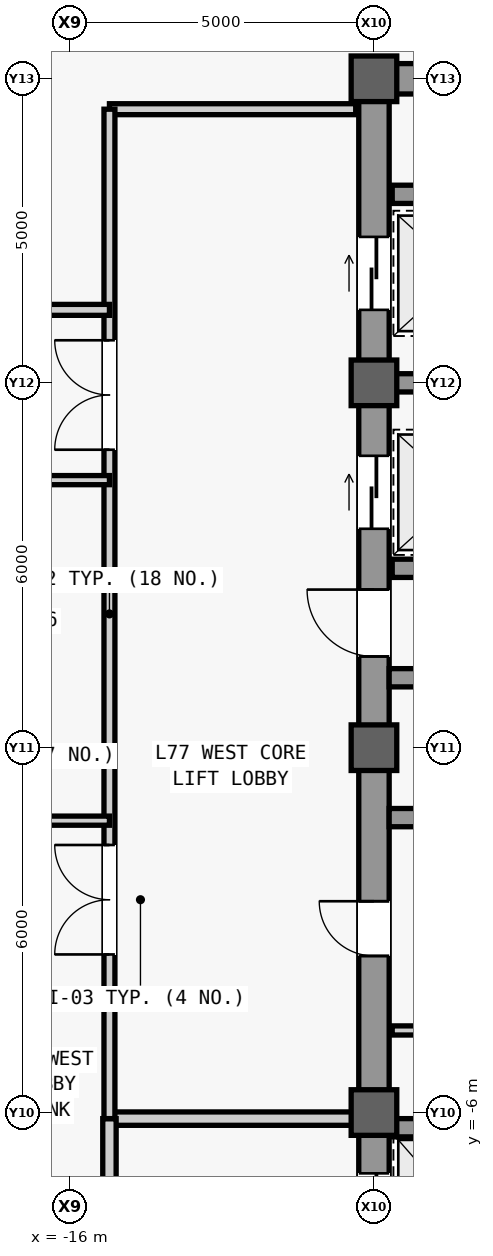
"""IFC4 building model, lengths in metres.
Left out: names, types, materials, properties, quantities, classifications, styles, units other than length and angle.
Written with IfcOpenShell. Run it as: python <this file> out.ifc"""

import sys

from ifc_helpers import new_model, si_unit, direction, frame, frame_2d, origin, origin_2d, place, context, subcontext, project, spatial, rectangle, extrude, source, transform, mapped, element, fill, save


model = new_model("IFC4")
c1 = context("Model", 3, precision=1e-05, world=origin(), true_north=direction((0.0, 1.0)))
c2 = subcontext(c1, "Body", "Model", "MODEL_VIEW")
j1 = project(units=[si_unit("LENGTHUNIT", "METRE"), si_unit("PLANEANGLEUNIT", "RADIAN")], contexts=[c1])
p1 = place(None, origin())
s1 = spatial("IfcSite", under=j1, at=p1, CompositionType="ELEMENT")
p2 = place(p1, origin())
s2 = spatial("IfcBuilding", under=s1, at=p2, CompositionType="ELEMENT")
p3 = place(p2, frame((0.0, 0.0, 326.3)))
s3 = spatial("IfcBuildingStorey", under=s2, at=p3, CompositionType="ELEMENT", Elevation=326.3)
m1 = source(origin(), c2, "Body", "SweptSolid", [
    extrude(rectangle(XDim=22.0, YDim=0.5, at=frame_2d((11.0, 0.0))), origin(), (0.0, 0.0, 1.0), 3.74),
])
p4 = place(p3, frame((-11.0, -11.0, 0.0), z_axis=(0.0, 0.0, 1.0), x_axis=(0.0, 1.0, 0.0)))
e1 = element("IfcWall", 1, at=p4, inside=s3, PredefinedType="SHEAR", context=c2, shape_type="MappedRepresentation", body=[
    mapped(m1, transform((0.0, 0.0, 0.0), scale=1.0)),
])
m2 = source(origin(), c2, "Body", "SweptSolid", [
    extrude(rectangle(XDim=1.1, YDim=2.2, at=frame_2d((0.55, 1.1))), frame((0.0, 0.26, 0.0), z_axis=(0.0, -1.0, 0.0), x_axis=(1.0, 0.0, 0.0)), (0.0, 0.0, 1.0), 0.52),
])
p5 = place(p4, frame((0.8, 0.0, 0.0)))
e2 = element("IfcOpeningElement", 2, at=p5, cuts=e1, PredefinedType="OPENING", context=c2, shape_type="MappedRepresentation", body=[
    mapped(m2, transform((0.0, 0.0, 0.0), scale=1.0)),
])
p6 = place(p4, frame((12.5, 0.0, 0.0)))
e3 = element("IfcOpeningElement", 3, at=p6, cuts=e1, PredefinedType="OPENING", context=c2, shape_type="MappedRepresentation", body=[
    mapped(m2, transform((0.0, 0.0, 0.0), scale=1.0)),
])
m3 = source(origin(), c2, "Body", "SweptSolid", [
    extrude(rectangle(XDim=0.9, YDim=2.15, at=frame_2d((0.45, 1.075))), frame((0.0, 0.26, 0.0), z_axis=(0.0, -1.0, 0.0), x_axis=(1.0, 0.0, 0.0)), (0.0, 0.0, 1.0), 0.52),
])
p7 = place(p4, frame((7.575, 0.0, 0.0)))
e4 = element("IfcOpeningElement", 4, at=p7, cuts=e1, PredefinedType="OPENING", context=c2, shape_type="MappedRepresentation", body=[
    mapped(m3, transform((0.0, 0.0, 0.0), scale=1.0)),
])
m4 = source(origin(), c2, "Body", "SweptSolid", [
    extrude(rectangle(XDim=1.2, YDim=2.3, at=frame_2d((0.6, 1.15))), frame((0.0, 0.26, 0.0), z_axis=(0.0, -1.0, 0.0), x_axis=(1.0, 0.0, 0.0)), (0.0, 0.0, 1.0), 0.52),
])
p8 = place(p4, frame((14.6, 0.0, 0.0)))
e5 = element("IfcOpeningElement", 5, at=p8, cuts=e1, PredefinedType="OPENING", context=c2, shape_type="MappedRepresentation", body=[
    mapped(m4, transform((0.0, 0.0, 0.0), scale=1.0)),
])
p9 = place(p4, frame((18.2, 0.0, 0.0)))
e6 = element("IfcOpeningElement", 6, at=p9, cuts=e1, PredefinedType="OPENING", context=c2, shape_type="MappedRepresentation", body=[
    mapped(m4, transform((0.0, 0.0, 0.0), scale=1.0)),
])
m5 = source(origin(), c2, "Body", "SweptSolid", [
    extrude(rectangle(XDim=1.3, YDim=2.3, at=frame_2d((0.65, 1.15))), frame((0.0, 0.26, 0.0), z_axis=(0.0, -1.0, 0.0), x_axis=(1.0, 0.0, 0.0)), (0.0, 0.0, 1.0), 0.52),
])
p10 = place(p4, frame((2.7, 0.0, 0.0)))
e7 = element("IfcOpeningElement", 7, at=p10, cuts=e1, PredefinedType="OPENING", context=c2, shape_type="MappedRepresentation", body=[
    mapped(m5, transform((0.0, 0.0, 0.0), scale=1.0)),
])
m6 = source(origin(), c2, "Body", "SweptSolid", [
    extrude(rectangle(XDim=5.9, YDim=0.5, at=frame_2d((2.95, 0.0))), origin(), (0.0, 0.0, 1.0), 3.74),
])
p11 = place(p3, frame((-10.75, 11.0, 0.0), z_axis=(0.0, 0.0, 1.0), x_axis=(1.0, 0.0, 0.0)))
e8 = element("IfcWall", 8, at=p11, inside=s3, PredefinedType="SHEAR", context=c2, shape_type="MappedRepresentation", body=[
    mapped(m6, transform((0.0, 0.0, 0.0), scale=1.0)),
])
m7 = source(origin(), c2, "Body", "SweptSolid", [
    extrude(rectangle(XDim=5.65, YDim=0.3, at=frame_2d((2.825, 0.0))), origin(), (0.0, 0.0, 1.0), 3.74),
])
for number, where, z_axis, x_axis in (
    (9, (-10.75, -1.15, 0.0), (0.0, 0.0, 1.0), (1.0, 0.0, 0.0)),
    (10, (-10.75, 1.15, 0.0), (0.0, 0.0, 1.0), (1.0, 0.0, 0.0)),
):
    element("IfcWall", number, at=place(p3, frame(where, z_axis=z_axis, x_axis=x_axis)), inside=s3, PredefinedType="SHEAR", context=c2, shape_type="MappedRepresentation", body=[
        mapped(m7, transform((0.0, 0.0, 0.0), scale=1.0)),
    ])
m8 = source(origin(), c2, "Body", "SweptSolid", [
    extrude(rectangle(XDim=0.75, YDim=0.75, at=origin_2d()), origin(), (0.0, 0.0, 1.0), 4.0),
])
for number, where, z_axis, x_axis in (
    (11, (-11.0, -6.0, 0.0), (0.0, 0.0, 1.0), (1.0, 0.0, 0.0)),
    (12, (-11.0, 0.0, 0.0), (0.0, 0.0, 1.0), (1.0, 0.0, 0.0)),
    (13, (-11.0, 6.0, 0.0), (0.0, 0.0, 1.0), (1.0, 0.0, 0.0)),
    (14, (-11.0, 11.0, 0.0), (0.0, 0.0, 1.0), (1.0, 0.0, 0.0)),
):
    element("IfcColumn", number, at=place(p3, frame(where, z_axis=z_axis, x_axis=x_axis)), inside=s3, PredefinedType="COLUMN", context=c2, shape_type="MappedRepresentation", body=[
        mapped(m8, transform((0.0, 0.0, 0.0), scale=1.0)),
    ])
m9 = source(origin(), c2, "Body", "SweptSolid", [
    extrude(rectangle(XDim=2.2, YDim=0.3, at=frame_2d((1.1, 0.0))), origin(), (0.0, 0.0, 1.0), 3.74),
])
for number, where, z_axis, x_axis in (
    (15, (-10.7, -6.25, 0.0), (0.0, 0.0, 1.0), (1.0, 0.0, 0.0)),
    (16, (-10.7, 2.95, 0.0), (0.0, 0.0, 1.0), (1.0, 0.0, 0.0)),
    (17, (-10.7, 6.0, 0.0), (0.0, 0.0, 1.0), (1.0, 0.0, 0.0)),
    (18, (-10.7, 9.1, 0.0), (0.0, 0.0, 1.0), (1.0, 0.0, 0.0)),
):
    element("IfcWall", number, at=place(p3, frame(where, z_axis=z_axis, x_axis=x_axis)), inside=s3, PredefinedType="SHEAR", context=c2, shape_type="MappedRepresentation", body=[
        mapped(m9, transform((0.0, 0.0, 0.0), scale=1.0)),
    ])
m10 = source(origin(), c2, "Body", "SweptSolid", [
    extrude(rectangle(XDim=2.05, YDim=0.15, at=frame_2d((1.025, 0.0))), origin(), (0.0, 0.0, 1.0), 3.74),
])
p12 = place(p3, frame((-10.7, -4.65, 0.0), z_axis=(0.0, 0.0, 1.0), x_axis=(1.0, 0.0, 0.0)))
e19 = element("IfcWall", 19, at=p12, inside=s3, PredefinedType="PARTITIONING", context=c2, shape_type="MappedRepresentation", body=[
    mapped(m10, transform((0.0, 0.0, 0.0), scale=1.0)),
])
m11 = source(origin(), c2, "Body", "SweptSolid", [
    extrude(rectangle(XDim=4.05, YDim=0.22, at=frame_2d((2.025, 0.0))), origin(), (0.0, 0.0, 1.0), 3.124),
])
p13 = place(p3, frame((-15.35, -6.1, 0.0), z_axis=(0.0, 0.0, 1.0), x_axis=(1.0, 0.0, 0.0)))
e20 = element("IfcWall", 20, at=p13, inside=s3, PredefinedType="PARTITIONING", context=c2, shape_type="MappedRepresentation", body=[
    mapped(m11, transform((0.0, 0.0, 0.0), scale=1.0)),
])
m12 = source(origin(), c2, "Body", "SweptSolid", [
    extrude(rectangle(XDim=4.4, YDim=0.22, at=frame_2d((2.2, 0.0))), origin(), (0.0, 0.0, 1.0), 3.74),
])
p14 = place(p3, frame((-15.35, -10.5, 0.0), z_axis=(0.0, 0.0, 1.0), x_axis=(0.0, 1.0, 0.0)))
e21 = element("IfcWall", 21, at=p14, inside=s3, PredefinedType="PARTITIONING", context=c2, shape_type="MappedRepresentation", body=[
    mapped(m12, transform((0.0, 0.0, 0.0), scale=1.0)),
])
m13 = source(origin(), c2, "Body", "SweptSolid", [
    extrude(rectangle(XDim=1.2, YDim=2.2, at=frame_2d((0.6, 1.1))), frame((0.0, 0.12, 0.0), z_axis=(0.0, -1.0, 0.0), x_axis=(1.0, 0.0, 0.0)), (0.0, 0.0, 1.0), 0.24),
])
p15 = place(p14, frame((1.6, 0.0, 0.0)))
e22 = element("IfcOpeningElement", 22, at=p15, cuts=e21, PredefinedType="OPENING", context=c2, shape_type="MappedRepresentation", body=[
    mapped(m13, transform((0.0, 0.0, 0.0), scale=1.0)),
])
m14 = source(origin(), c2, "Body", "SweptSolid", [
    extrude(rectangle(XDim=4.05, YDim=0.18, at=frame_2d((2.025, 0.0))), origin(), (0.0, 0.0, 1.0), 3.74),
])
p16 = place(p3, frame((-15.35, 10.5, 0.0), z_axis=(0.0, 0.0, 1.0), x_axis=(1.0, 0.0, 0.0)))
e23 = element("IfcWall", 23, at=p16, inside=s3, PredefinedType="PARTITIONING", context=c2, shape_type="MappedRepresentation", body=[
    mapped(m14, transform((0.0, 0.0, 0.0), scale=1.0)),
])
m15 = source(origin(), c2, "Body", "SweptSolid", [
    extrude(rectangle(XDim=16.6, YDim=0.18, at=frame_2d((8.3, 0.0))), origin(), (0.0, 0.0, 1.0), 3.74),
])
p17 = place(p3, frame((-15.35, -6.1, 0.0), z_axis=(0.0, 0.0, 1.0), x_axis=(0.0, 1.0, 0.0)))
e24 = element("IfcWall", 24, at=p17, inside=s3, PredefinedType="PARTITIONING", context=c2, shape_type="MappedRepresentation", body=[
    mapped(m15, transform((0.0, 0.0, 0.0), scale=1.0)),
])
m16 = source(origin(), c2, "Body", "SweptSolid", [
    extrude(rectangle(XDim=1.8, YDim=2.25, at=frame_2d((0.9, 1.125))), frame((0.0, 0.1, 0.0), z_axis=(0.0, -1.0, 0.0), x_axis=(1.0, 0.0, 0.0)), (0.0, 0.0, 1.0), 0.2),
])
p18 = place(p17, frame((2.7, 0.0, 0.0)))
e25 = element("IfcOpeningElement", 25, at=p18, cuts=e24, PredefinedType="OPENING", context=c2, shape_type="MappedRepresentation", body=[
    mapped(m16, transform((0.0, 0.0, 0.0), scale=1.0)),
])
p19 = place(p17, frame((11.0, 0.0, 0.0)))
e26 = element("IfcOpeningElement", 26, at=p19, cuts=e24, PredefinedType="OPENING", context=c2, shape_type="MappedRepresentation", body=[
    mapped(m16, transform((0.0, 0.0, 0.0), scale=1.0)),
])
m17 = source(origin(), c2, "Body", "SweptSolid", [
    extrude(rectangle(XDim=2.05, YDim=0.15, at=frame_2d((1.025, 0.0))), origin(), (0.0, 0.0, 1.0), 3.74),
])
for number, where, z_axis, x_axis in (
    (27, (-17.4, -1.2, 0.0), (0.0, 0.0, 1.0), (1.0, 0.0, 0.0)),
    (28, (-17.4, 4.4, 0.0), (0.0, 0.0, 1.0), (1.0, 0.0, 0.0)),
):
    element("IfcWall", number, at=place(p3, frame(where, z_axis=z_axis, x_axis=x_axis)), inside=s3, PredefinedType="PARTITIONING", context=c2, shape_type="MappedRepresentation", body=[
        mapped(m17, transform((0.0, 0.0, 0.0), scale=1.0)),
    ])
m18 = source(origin(), c2, "Body", "SweptSolid", [
    extrude(rectangle(XDim=2.05, YDim=0.18, at=frame_2d((1.025, 0.0))), origin(), (0.0, 0.0, 1.0), 3.74),
])
p20 = place(p3, frame((-17.4, 7.2, 0.0), z_axis=(0.0, 0.0, 1.0), x_axis=(1.0, 0.0, 0.0)))
e29 = element("IfcWall", 29, at=p20, inside=s3, PredefinedType="PARTITIONING", context=c2, shape_type="MappedRepresentation", body=[
    mapped(m18, transform((0.0, 0.0, 0.0), scale=1.0)),
])
m19 = source(origin(), c2, "Body", "SweptSolid", [
    extrude(rectangle(XDim=1.1, YDim=2.2, at=frame_2d((0.55, 1.1))), frame((0.0, 0.025, 0.0), z_axis=(0.0, -1.0, 0.0), x_axis=(1.0, 0.0, 0.0)), (0.0, 0.0, 1.0), 0.05),
])
p21 = place(p6, origin())
e30 = element("IfcDoor", 30, at=p21, inside=s3, OperationType="SINGLE_SWING_RIGHT", PredefinedType="DOOR", context=c2, shape_type="MappedRepresentation", body=[
    mapped(m19, transform((0.0, 0.0, 0.0), scale=1.0)),
])
fill(e3, e30)
m20 = source(origin(), c2, "Body", "SweptSolid", [
    extrude(rectangle(XDim=0.9, YDim=2.15, at=frame_2d((0.45, 1.075))), frame((0.0, 0.025, 0.0), z_axis=(0.0, -1.0, 0.0), x_axis=(1.0, 0.0, 0.0)), (0.0, 0.0, 1.0), 0.05),
])
p22 = place(p7, origin())
e31 = element("IfcDoor", 31, at=p22, inside=s3, OperationType="SINGLE_SWING_RIGHT", PredefinedType="DOOR", context=c2, shape_type="MappedRepresentation", body=[
    mapped(m20, transform((0.0, 0.0, 0.0), scale=1.0)),
])
fill(e4, e31)
m21 = source(origin(), c2, "Body", "SweptSolid", [
    extrude(rectangle(XDim=1.8, YDim=2.25, at=frame_2d((0.9, 1.125))), frame((0.0, 0.025, 0.0), z_axis=(0.0, -1.0, 0.0), x_axis=(1.0, 0.0, 0.0)), (0.0, 0.0, 1.0), 0.05),
])
p23 = place(p18, origin())
e32 = element("IfcDoor", 32, at=p23, inside=s3, OperationType="SINGLE_SWING_LEFT", PredefinedType="DOOR", context=c2, shape_type="MappedRepresentation", body=[
    mapped(m21, transform((0.0, 0.0, 0.0), scale=1.0)),
])
fill(e25, e32)
p24 = place(p19, origin())
e33 = element("IfcDoor", 33, at=p24, inside=s3, OperationType="SINGLE_SWING_RIGHT", PredefinedType="DOOR", context=c2, shape_type="MappedRepresentation", body=[
    mapped(m21, transform((0.0, 0.0, 0.0), scale=1.0)),
])
fill(e26, e33)
m22 = source(origin(), c2, "Body", "SweptSolid", [
    extrude(rectangle(XDim=1.2, YDim=2.3, at=frame_2d((0.6, 1.15))), frame((0.0, 0.025, 0.0), z_axis=(0.0, -1.0, 0.0), x_axis=(1.0, 0.0, 0.0)), (0.0, 0.0, 1.0), 0.05),
])
p25 = place(p8, origin())
e34 = element("IfcDoor", 34, at=p25, inside=s3, OperationType="SLIDING_TO_LEFT", PredefinedType="DOOR", context=c2, shape_type="MappedRepresentation", body=[
    mapped(m22, transform((0.0, 0.0, 0.0), scale=1.0)),
])
fill(e5, e34)
p26 = place(p9, origin())
e35 = element("IfcDoor", 35, at=p26, inside=s3, OperationType="SLIDING_TO_LEFT", PredefinedType="DOOR", context=c2, shape_type="MappedRepresentation", body=[
    mapped(m22, transform((0.0, 0.0, 0.0), scale=1.0)),
])
fill(e6, e35)
m23 = source(origin(), c2, "Body", "SweptSolid", [
    extrude(rectangle(XDim=1.3, YDim=2.3, at=frame_2d((0.65, 1.15))), frame((0.0, 0.025, 0.0), z_axis=(0.0, -1.0, 0.0), x_axis=(1.0, 0.0, 0.0)), (0.0, 0.0, 1.0), 0.05),
])
p27 = place(p10, origin())
e36 = element("IfcDoor", 36, at=p27, inside=s3, OperationType="SLIDING_TO_LEFT", PredefinedType="DOOR", context=c2, shape_type="MappedRepresentation", body=[
    mapped(m23, transform((0.0, 0.0, 0.0), scale=1.0)),
])
fill(e7, e36)
save(model, sys.argv[1])
